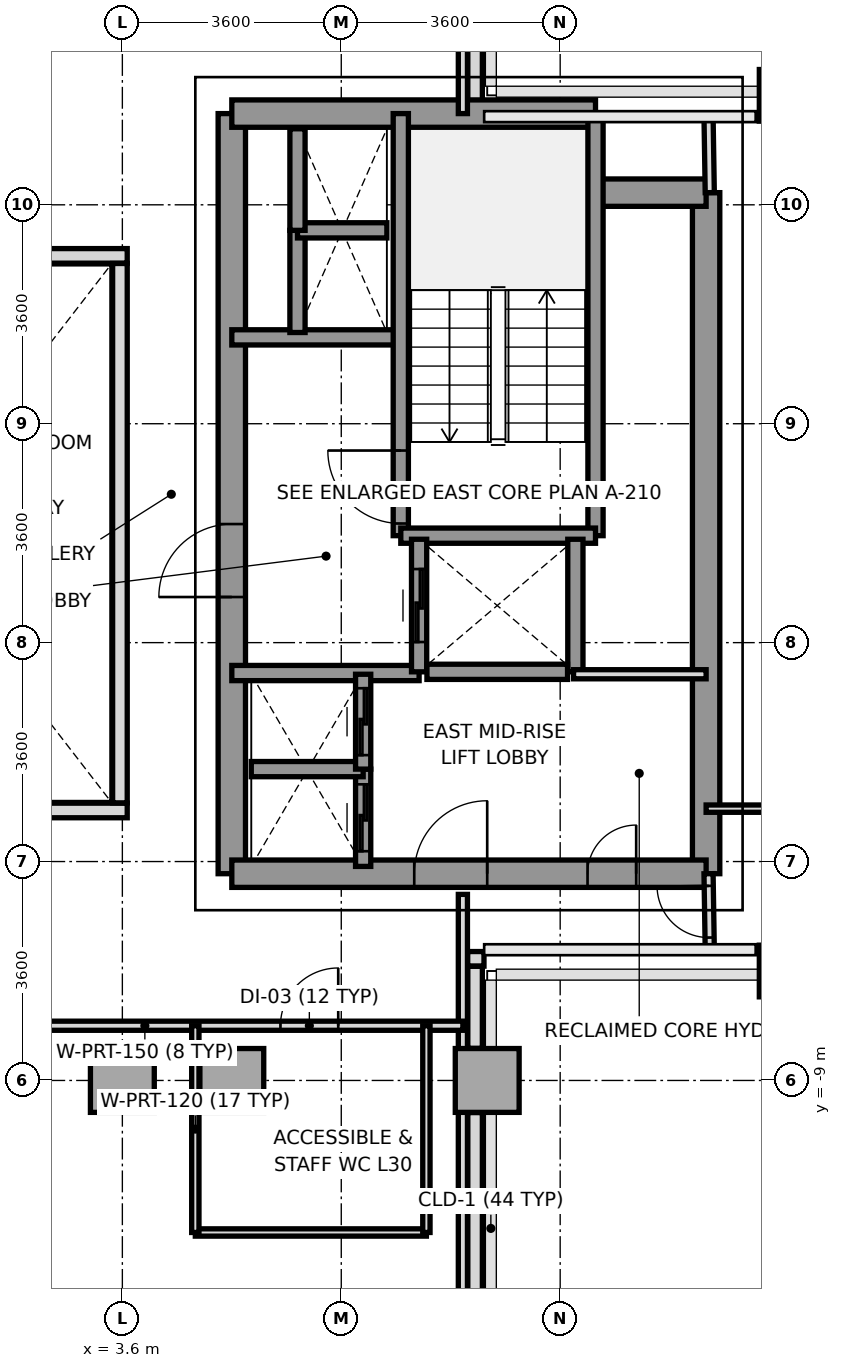
"""IFC4 building model, lengths in metres.
Left out: names, types, materials, properties, quantities, classifications, styles, units other than length and angle.
Written with IfcOpenShell. Run it as: python <this file> out.ifc"""

import sys

from ifc_helpers import new_model, si_unit, direction, frame, frame_2d, origin, origin_2d, place, context, subcontext, project, spatial, rectangle, extrude, source, transform, mapped, element, fill, save


model = new_model("IFC4")
c1 = context("Model", 3, precision=1e-05, world=origin(), true_north=direction((0.0, 1.0)))
c2 = subcontext(c1, "Body", "Model", "MODEL_VIEW")
j1 = project(units=[si_unit("LENGTHUNIT", "METRE"), si_unit("PLANEANGLEUNIT", "RADIAN")], contexts=[c1])
p1 = place(None, origin())
s1 = spatial("IfcSite", under=j1, at=p1, CompositionType="ELEMENT")
p2 = place(p1, origin())
s2 = spatial("IfcBuilding", under=s1, at=p2, CompositionType="ELEMENT")
p3 = place(p2, frame((0.0, 0.0, 114.2)))
s3 = spatial("IfcBuildingStorey", under=s2, at=p3, CompositionType="ELEMENT", Elevation=114.2)
m1 = source(origin(), c2, "Body", "SweptSolid", [
    extrude(rectangle(XDim=1.05, YDim=1.05, at=origin_2d()), origin(), (0.0, 0.0, 1.0), 3.2),
])
for number, where, z_axis, x_axis in (
    (1, (3.6, -9.0, 0.0), (0.0, 0.0, 1.0), (1.0, 0.0, 0.0)),
    (2, (5.4, -9.0, 0.0), (0.0, 0.0, 1.0), (1.0, 0.0, 0.0)),
    (3, (9.6, -9.0, 0.0), (0.0, 0.0, 1.0), (1.0, 0.0, 0.0)),
):
    element("IfcColumn", number, at=place(p3, frame(where, z_axis=z_axis, x_axis=x_axis)), inside=s3, PredefinedType="COLUMN", context=c2, shape_type="MappedRepresentation", body=[
        mapped(m1, transform((0.0, 0.0, 0.0), x_axis=(1.0, 0.0, 0.0), y_axis=(0.0, 1.0, 0.0), z_axis=(0.0, 0.0, 1.0), scale=1.0)),
    ])
m2 = source(origin(), c2, "Body", "SweptSolid", [
    extrude(rectangle(XDim=0.65, YDim=0.85, at=origin_2d()), origin(), (0.0, 0.0, 1.0), 3.2),
])
for number, where, z_axis, x_axis in (
    (4, (14.4, -7.2, 0.0), (0.0, 0.0, 1.0), (1.0, 0.0, 0.0)),
    (5, (14.4, 7.2, 0.0), (0.0, 0.0, 1.0), (1.0, 0.0, 0.0)),
):
    element("IfcColumn", number, at=place(p3, frame(where, z_axis=z_axis, x_axis=x_axis)), inside=s3, PredefinedType="COLUMN", context=c2, shape_type="MappedRepresentation", body=[
        mapped(m2, transform((0.0, 0.0, 0.0), x_axis=(1.0, 0.0, 0.0), y_axis=(0.0, 1.0, 0.0), z_axis=(0.0, 0.0, 1.0), scale=1.0)),
    ])
p4 = place(p3, frame((9.547, -7.0, 0.0), z_axis=(0.0, 0.0, 1.0), x_axis=(-1.0, 0.0, 0.0)))
e6 = element("IfcWall", 6, at=p4, inside=s3, PredefinedType="PARAPET", context=c2, shape_type="SweptSolid", body=[
    extrude(rectangle(XDim=0.269, YDim=0.24, at=frame_2d((0.135, 0.0))), origin(), (0.0, 0.0, 1.0), 1.15),
])
p5 = place(p3, frame((9.4, -7.123, 0.0), z_axis=(0.0, 0.0, 1.0), x_axis=(0.0, -1.0, 0.0)))
e7 = element("IfcWall", 7, at=p5, inside=s3, PredefinedType="PARAPET", context=c2, shape_type="SweptSolid", body=[
    extrude(rectangle(XDim=1.349, YDim=0.24, at=frame_2d((0.674, 0.0))), origin(), (0.0, 0.0, 1.0), 1.15),
])
p6 = place(p3, frame((9.4, -9.528, 0.0), z_axis=(0.0, 0.0, 1.0), x_axis=(0.0, -1.0, 0.0)))
e8 = element("IfcWall", 8, at=p6, inside=s3, PredefinedType="PARAPET", context=c2, shape_type="SweptSolid", body=[
    extrude(rectangle(XDim=6.075, YDim=0.24, at=frame_2d((3.037, 0.0))), origin(), (0.0, 0.0, 1.0), 1.15),
])
p7 = place(p3, frame((9.4, 8.472, 0.0), z_axis=(0.0, 0.0, 1.0), x_axis=(0.0, -1.0, 0.0)))
e9 = element("IfcWall", 9, at=p7, inside=s3, PredefinedType="PARAPET", context=c2, shape_type="SweptSolid", body=[
    extrude(rectangle(XDim=1.519, YDim=0.24, at=frame_2d((0.76, 0.0))), origin(), (0.0, 0.0, 1.0), 1.15),
])
p8 = place(p3, frame((13.2, -5.6, 0.0), z_axis=(0.0, 0.0, 1.0), x_axis=(0.0, 1.0, 0.0)))
e10 = element("IfcWall", 10, at=p8, inside=s3, PredefinedType="SHEAR", context=c2, shape_type="SweptSolid", body=[
    extrude(rectangle(XDim=11.2, YDim=0.45, at=frame_2d((5.6, 0.0))), origin(), (0.0, 0.0, 1.0), 3.2),
])
p9 = place(p3, frame((5.4, -5.6, 0.0), z_axis=(0.0, 0.0, 1.0), x_axis=(0.0, 1.0, 0.0)))
e11 = element("IfcWall", 11, at=p9, inside=s3, PredefinedType="SHEAR", context=c2, shape_type="SweptSolid", body=[
    extrude(rectangle(XDim=12.5, YDim=0.45, at=frame_2d((6.25, 0.0))), origin(), (0.0, 0.0, 1.0), 3.2),
])
p10 = place(p9, frame((4.55, 0.0, 0.0)))
e12 = element("IfcOpeningElement", 12, at=p10, cuts=e11, PredefinedType="OPENING", context=c2, shape_type="SweptSolid", body=[
    extrude(rectangle(XDim=1.2, YDim=2.2, at=frame_2d((0.6, 1.1))), frame((0.0, 0.235, 0.0), z_axis=(0.0, -1.0, 0.0), x_axis=(1.0, 0.0, 0.0)), (0.0, 0.0, 1.0), 0.47),
])
p11 = place(p3, frame((5.4, 6.9, 0.0), z_axis=(0.0, 0.0, 1.0), x_axis=(1.0, 0.0, 0.0)))
e13 = element("IfcWall", 13, at=p11, inside=s3, PredefinedType="SHEAR", context=c2, shape_type="SweptSolid", body=[
    extrude(rectangle(XDim=5.981, YDim=0.45, at=frame_2d((2.991, 0.0))), origin(), (0.0, 0.0, 1.0), 3.2),
])
p12 = place(p3, frame((11.381, 5.6, 0.0), z_axis=(0.0, 0.0, 1.0), x_axis=(1.0, 0.0, 0.0)))
e14 = element("IfcWall", 14, at=p12, inside=s3, PredefinedType="SHEAR", context=c2, shape_type="SweptSolid", body=[
    extrude(rectangle(XDim=1.819, YDim=0.45, at=frame_2d((0.909, 0.0))), origin(), (0.0, 0.0, 1.0), 3.2),
])
p13 = place(p3, frame((5.4, -5.6, 0.0), z_axis=(0.0, 0.0, 1.0), x_axis=(1.0, 0.0, 0.0)))
e15 = element("IfcWall", 15, at=p13, inside=s3, PredefinedType="SHEAR", context=c2, shape_type="SweptSolid", body=[
    extrude(rectangle(XDim=7.8, YDim=0.45, at=frame_2d((3.9, 0.0))), origin(), (0.0, 0.0, 1.0), 3.2),
])
p14 = place(p13, frame((3.0, 0.0, 0.0)))
e16 = element("IfcOpeningElement", 16, at=p14, cuts=e15, PredefinedType="OPENING", context=c2, shape_type="SweptSolid", body=[
    extrude(rectangle(XDim=1.2, YDim=2.2, at=frame_2d((0.6, 1.1))), frame((0.0, 0.235, 0.0), z_axis=(0.0, -1.0, 0.0), x_axis=(1.0, 0.0, 0.0)), (0.0, 0.0, 1.0), 0.47),
])
p15 = place(p13, frame((5.85, 0.0, 0.0)))
e17 = element("IfcOpeningElement", 17, at=p15, cuts=e15, PredefinedType="OPENING", context=c2, shape_type="SweptSolid", body=[
    extrude(rectangle(XDim=0.8, YDim=2.1, at=frame_2d((0.4, 1.05))), frame((0.0, 0.235, 0.0), z_axis=(0.0, -1.0, 0.0), x_axis=(1.0, 0.0, 0.0)), (0.0, 0.0, 1.0), 0.47),
])
p16 = place(p3, frame((5.4, 3.22, 0.0), z_axis=(0.0, 0.0, 1.0), x_axis=(1.0, 0.0, 0.0)))
e18 = element("IfcWall", 18, at=p16, inside=s3, PredefinedType="SOLIDWALL", context=c2, shape_type="SweptSolid", body=[
    extrude(rectangle(XDim=2.78, YDim=0.25, at=frame_2d((1.39, 0.0))), origin(), (0.0, 0.0, 1.0), 3.2),
])
p17 = place(p3, frame((5.4, -2.3, 0.0), z_axis=(0.0, 0.0, 1.0), x_axis=(1.0, 0.0, 0.0)))
e19 = element("IfcWall", 19, at=p17, inside=s3, PredefinedType="SOLIDWALL", context=c2, shape_type="SweptSolid", body=[
    extrude(rectangle(XDim=3.08, YDim=0.25, at=frame_2d((1.54, 0.0))), origin(), (0.0, 0.0, 1.0), 3.2),
])
p18 = place(p3, frame((8.179, -0.041, 0.0), z_axis=(0.0, 0.0, 1.0), x_axis=(0.0, 1.0, 0.0)))
e20 = element("IfcWall", 20, at=p18, inside=s3, PredefinedType="SOLIDWALL", context=c2, shape_type="SweptSolid", body=[
    extrude(rectangle(XDim=6.941, YDim=0.25, at=frame_2d((3.47, 0.0))), origin(), (0.0, 0.0, 1.0), 3.2),
])
p19 = place(p18, frame((0.2, 0.0, 0.0)))
e21 = element("IfcOpeningElement", 21, at=p19, cuts=e20, PredefinedType="OPENING", context=c2, shape_type="SweptSolid", body=[
    extrude(rectangle(XDim=1.2, YDim=2.2, at=frame_2d((0.6, 1.1))), frame((0.0, 0.135, 0.0), z_axis=(0.0, -1.0, 0.0), x_axis=(1.0, 0.0, 0.0)), (0.0, 0.0, 1.0), 0.27),
])
p20 = place(p3, frame((11.381, -0.041, 0.0), z_axis=(0.0, 0.0, 1.0), x_axis=(0.0, 1.0, 0.0)))
e22 = element("IfcWall", 22, at=p20, inside=s3, PredefinedType="SOLIDWALL", context=c2, shape_type="SweptSolid", body=[
    extrude(rectangle(XDim=6.941, YDim=0.25, at=frame_2d((3.47, 0.0))), origin(), (0.0, 0.0, 1.0), 3.2),
])
p21 = place(p3, frame((8.179, -0.041, 0.0), z_axis=(0.0, 0.0, 1.0), x_axis=(1.0, 0.0, 0.0)))
e23 = element("IfcWall", 23, at=p21, inside=s3, PredefinedType="SOLIDWALL", context=c2, shape_type="SweptSolid", body=[
    extrude(rectangle(XDim=3.202, YDim=0.25, at=frame_2d((1.601, 0.0))), origin(), (0.0, 0.0, 1.0), 3.2),
])
p22 = place(p3, frame((8.48, -2.28, 0.0), z_axis=(0.0, 0.0, 1.0), x_axis=(0.0, 1.0, 0.0)))
e24 = element("IfcWall", 24, at=p22, inside=s3, PredefinedType="SOLIDWALL", context=c2, shape_type="SweptSolid", body=[
    extrude(rectangle(XDim=2.18, YDim=0.25, at=frame_2d((1.09, 0.0))), origin(), (0.0, 0.0, 1.0), 3.2),
])
p23 = place(p22, frame((0.49, 0.0, 0.0)))
e25 = element("IfcOpeningElement", 25, at=p23, cuts=e24, PredefinedType="OPENING", context=c2, shape_type="SweptSolid", body=[
    extrude(rectangle(XDim=1.2, YDim=2.2, at=frame_2d((0.6, 1.1))), frame((0.0, 0.135, 0.0), z_axis=(0.0, -1.0, 0.0), x_axis=(1.0, 0.0, 0.0)), (0.0, 0.0, 1.0), 0.27),
])
p24 = place(p3, frame((11.05, -2.28, 0.0), z_axis=(0.0, 0.0, 1.0), x_axis=(0.0, 1.0, 0.0)))
e26 = element("IfcWall", 26, at=p24, inside=s3, PredefinedType="SOLIDWALL", context=c2, shape_type="SweptSolid", body=[
    extrude(rectangle(XDim=2.18, YDim=0.25, at=frame_2d((1.09, 0.0))), origin(), (0.0, 0.0, 1.0), 3.2),
])
p25 = place(p3, frame((8.609, -2.28, 0.0), z_axis=(0.0, 0.0, 1.0), x_axis=(1.0, 0.0, 0.0)))
e27 = element("IfcWall", 27, at=p25, inside=s3, PredefinedType="SOLIDWALL", context=c2, shape_type="SweptSolid", body=[
    extrude(rectangle(XDim=2.312, YDim=0.25, at=frame_2d((1.156, 0.0))), origin(), (0.0, 0.0, 1.0), 3.2),
])
p26 = place(p3, frame((7.56, -5.48, 0.0), z_axis=(0.0, 0.0, 1.0), x_axis=(0.0, 1.0, 0.0)))
e28 = element("IfcWall", 28, at=p26, inside=s3, PredefinedType="SOLIDWALL", context=c2, shape_type="SweptSolid", body=[
    extrude(rectangle(XDim=1.6, YDim=0.25, at=frame_2d((0.8, 0.0))), origin(), (0.0, 0.0, 1.0), 3.2),
])
p27 = place(p26, frame((0.25, 0.0, 0.0)))
e29 = element("IfcOpeningElement", 29, at=p27, cuts=e28, PredefinedType="OPENING", context=c2, shape_type="SweptSolid", body=[
    extrude(rectangle(XDim=1.1, YDim=2.2, at=frame_2d((0.55, 1.1))), frame((0.0, 0.135, 0.0), z_axis=(0.0, -1.0, 0.0), x_axis=(1.0, 0.0, 0.0)), (0.0, 0.0, 1.0), 0.27),
])
p28 = place(p3, frame((5.72, -3.88, 0.0), z_axis=(0.0, 0.0, 1.0), x_axis=(1.0, 0.0, 0.0)))
e30 = element("IfcWall", 30, at=p28, inside=s3, PredefinedType="SOLIDWALL", context=c2, shape_type="SweptSolid", body=[
    extrude(rectangle(XDim=1.84, YDim=0.25, at=frame_2d((0.92, 0.0))), origin(), (0.0, 0.0, 1.0), 3.2),
])
p29 = place(p3, frame((7.56, -3.88, 0.0), z_axis=(0.0, 0.0, 1.0), x_axis=(0.0, 1.0, 0.0)))
e31 = element("IfcWall", 31, at=p29, inside=s3, PredefinedType="SOLIDWALL", context=c2, shape_type="SweptSolid", body=[
    extrude(rectangle(XDim=1.56, YDim=0.25, at=frame_2d((0.78, 0.0))), origin(), (0.0, 0.0, 1.0), 3.2),
])
p30 = place(p29, frame((0.23, 0.0, 0.0)))
e32 = element("IfcOpeningElement", 32, at=p30, cuts=e31, PredefinedType="OPENING", context=c2, shape_type="SweptSolid", body=[
    extrude(rectangle(XDim=1.1, YDim=2.2, at=frame_2d((0.55, 1.1))), frame((0.0, 0.135, 0.0), z_axis=(0.0, -1.0, 0.0), x_axis=(1.0, 0.0, 0.0)), (0.0, 0.0, 1.0), 0.27),
])
p31 = place(p3, frame((6.48, 3.3, 0.0), z_axis=(0.0, 0.0, 1.0), x_axis=(0.0, 1.0, 0.0)))
e33 = element("IfcWall", 33, at=p31, inside=s3, PredefinedType="SOLIDWALL", context=c2, shape_type="SweptSolid", body=[
    extrude(rectangle(XDim=1.68, YDim=0.25, at=frame_2d((0.84, 0.0))), origin(), (0.0, 0.0, 1.0), 3.2),
])
p32 = place(p3, frame((6.48, 4.98, 0.0), z_axis=(0.0, 0.0, 1.0), x_axis=(1.0, 0.0, 0.0)))
e34 = element("IfcWall", 34, at=p32, inside=s3, PredefinedType="SOLIDWALL", context=c2, shape_type="SweptSolid", body=[
    extrude(rectangle(XDim=1.47, YDim=0.25, at=frame_2d((0.735, 0.0))), origin(), (0.0, 0.0, 1.0), 3.2),
])
p33 = place(p3, frame((6.48, 4.98, 0.0), z_axis=(0.0, 0.0, 1.0), x_axis=(0.0, 1.0, 0.0)))
e35 = element("IfcWall", 35, at=p33, inside=s3, PredefinedType="SOLIDWALL", context=c2, shape_type="SweptSolid", body=[
    extrude(rectangle(XDim=1.67, YDim=0.25, at=frame_2d((0.835, 0.0))), origin(), (0.0, 0.0, 1.0), 3.2),
])
p34 = place(p3, frame((11.02, -2.32, 0.0), z_axis=(0.0, 0.0, 1.0), x_axis=(1.0, 0.0, 0.0)))
e36 = element("IfcWall", 36, at=p34, inside=s3, PredefinedType="PARTITIONING", context=c2, shape_type="SweptSolid", body=[
    extrude(rectangle(XDim=2.18, YDim=0.15, at=frame_2d((1.09, 0.0))), origin(), (0.0, 0.0, 1.0), 3.2),
])
p35 = place(p3, frame((9.2, 6.9, 0.0), z_axis=(0.0, 0.0, 1.0), x_axis=(0.0, 1.0, 0.0)))
e37 = element("IfcWall", 37, at=p35, inside=s3, PredefinedType="PARTITIONING", context=c2, shape_type="SweptSolid", body=[
    extrude(rectangle(XDim=8.78, YDim=0.15, at=frame_2d((4.39, 0.0))), origin(), (0.0, 0.0, 1.0), 2.7),
])
p36 = place(p3, frame((9.2, -15.68, 0.0), z_axis=(0.0, 0.0, 1.0), x_axis=(0.0, 1.0, 0.0)))
e38 = element("IfcWall", 38, at=p36, inside=s3, PredefinedType="PARTITIONING", context=c2, shape_type="SweptSolid", body=[
    extrude(rectangle(XDim=9.74, YDim=0.15, at=frame_2d((4.87, 0.0))), origin(), (0.0, 0.0, 1.0), 2.7),
])
p37 = place(p3, frame((-1.26, -8.1, 0.0), z_axis=(0.0, 0.0, 1.0), x_axis=(1.0, 0.0, 0.0)))
e39 = element("IfcWall", 39, at=p37, inside=s3, PredefinedType="PARTITIONING", context=c2, shape_type="SweptSolid", body=[
    extrude(rectangle(XDim=10.46, YDim=0.15, at=frame_2d((5.23, 0.0))), origin(), (0.0, 0.0, 1.0), 2.75),
])
p38 = place(p37, frame((7.46, 0.0, 0.0)))
e40 = element("IfcOpeningElement", 40, at=p38, cuts=e39, PredefinedType="OPENING", context=c2, shape_type="SweptSolid", body=[
    extrude(rectangle(XDim=0.95, YDim=2.15, at=frame_2d((0.475, 1.075))), frame((0.0, 0.085, 0.0), z_axis=(0.0, -1.0, 0.0), x_axis=(1.0, 0.0, 0.0)), (0.0, 0.0, 1.0), 0.17),
])
p39 = place(p3, frame((4.8, -11.5, 0.0), z_axis=(0.0, 0.0, 1.0), x_axis=(1.0, 0.0, 0.0)))
e41 = element("IfcWall", 41, at=p39, inside=s3, PredefinedType="PARTITIONING", context=c2, shape_type="SweptSolid", body=[
    extrude(rectangle(XDim=3.8, YDim=0.12, at=frame_2d((1.9, 0.0))), origin(), (0.0, 0.0, 1.0), 3.2),
])
p40 = place(p3, frame((4.8, -11.5, 0.0), z_axis=(0.0, 0.0, 1.0), x_axis=(0.0, 1.0, 0.0)))
e42 = element("IfcWall", 42, at=p40, inside=s3, PredefinedType="PARTITIONING", context=c2, shape_type="SweptSolid", body=[
    extrude(rectangle(XDim=3.4, YDim=0.12, at=frame_2d((1.7, 0.0))), origin(), (0.0, 0.0, 1.0), 3.2),
])
p41 = place(p3, frame((8.6, -11.5, 0.0), z_axis=(0.0, 0.0, 1.0), x_axis=(0.0, 1.0, 0.0)))
e43 = element("IfcWall", 43, at=p41, inside=s3, PredefinedType="PARTITIONING", context=c2, shape_type="SweptSolid", body=[
    extrude(rectangle(XDim=3.4, YDim=0.12, at=frame_2d((1.7, 0.0))), origin(), (0.0, 0.0, 1.0), 2.7),
])
p42 = place(p3, frame((13.26, 5.6, 0.0), z_axis=(0.0, 0.0, 1.0), x_axis=(-0.016013571389, 0.999871774545, 0.0)))
e44 = element("IfcWall", 44, at=p42, inside=s3, PredefinedType="PARTITIONING", context=c2, shape_type="SweptSolid", body=[
    extrude(rectangle(XDim=1.25, YDim=0.15, at=frame_2d((0.625, 0.0))), origin(), (0.0, 0.0, 1.0), 3.2),
])
p43 = place(p3, frame((13.26, -6.85, 0.0), z_axis=(0.0, 0.0, 1.0), x_axis=(-0.016013571389, 0.999871774545, 0.0)))
e45 = element("IfcWall", 45, at=p43, inside=s3, PredefinedType="PARTITIONING", context=c2, shape_type="SweptSolid", body=[
    extrude(rectangle(XDim=1.25, YDim=0.15, at=frame_2d((0.625, 0.0))), origin(), (0.0, 0.0, 1.0), 3.2),
])
p44 = place(p43, frame((0.2, 0.0, 0.0)))
e46 = element("IfcOpeningElement", 46, at=p44, cuts=e45, PredefinedType="OPENING", context=c2, shape_type="SweptSolid", body=[
    extrude(rectangle(XDim=0.85, YDim=2.1, at=frame_2d((0.425, 1.05))), frame((0.0, 0.085, 0.0), z_axis=(0.0, -1.0, 0.0), x_axis=(1.0, 0.0, 0.0)), (0.0, 0.0, 1.0), 0.17),
])
p45 = place(p3, frame((13.2, -4.53, 0.0), z_axis=(0.0, 0.0, 1.0), x_axis=(1.0, 0.0, 0.0)))
e47 = element("IfcWall", 47, at=p45, inside=s3, PredefinedType="PARTITIONING", context=c2, shape_type="SweptSolid", body=[
    extrude(rectangle(XDim=10.1, YDim=0.12, at=frame_2d((5.05, 0.0))), origin(), (0.0, 0.0, 1.0), 2.75),
])
p46 = place(p45, frame((7.65, 0.0, 0.0)))
e48 = element("IfcOpeningElement", 48, at=p46, cuts=e47, PredefinedType="OPENING", context=c2, shape_type="SweptSolid", body=[
    extrude(rectangle(XDim=0.95, YDim=2.15, at=frame_2d((0.475, 1.075))), frame((0.0, 0.07, 0.0), z_axis=(0.0, -1.0, 0.0), x_axis=(1.0, 0.0, 0.0)), (0.0, 0.0, 1.0), 0.14),
])
for number, where, z_axis, x_axis in (
    (49, (-3.68, -4.56, 0.0), (0.0, 0.0, 1.0), (1.0, 0.0, 0.0)),
    (50, (-3.68, 4.56, 0.0), (0.0, 0.0, 1.0), (1.0, 0.0, 0.0)),
):
    element("IfcWall", number, at=place(p3, frame(where, z_axis=z_axis, x_axis=x_axis)), inside=s3, PredefinedType="PARAPET", context=c2, shape_type="SweptSolid", body=[
        extrude(rectangle(XDim=7.36, YDim=0.24, at=frame_2d((3.68, 0.0))), origin(), (0.0, 0.0, 1.0), 1.15),
    ])
p47 = place(p3, frame((3.56, -4.435, 0.0), z_axis=(0.0, 0.0, 1.0), x_axis=(0.0, 1.0, 0.0)))
e51 = element("IfcWall", 51, at=p47, inside=s3, PredefinedType="PARAPET", context=c2, shape_type="SweptSolid", body=[
    extrude(rectangle(XDim=8.87, YDim=0.24, at=frame_2d((4.435, 0.0))), origin(), (0.0, 0.0, 1.0), 1.15),
])
m3 = source(origin(), c2, "Body", "SweptSolid", [
    extrude(rectangle(XDim=1.2, YDim=2.2, at=frame_2d((0.6, 1.1))), frame((0.0, 0.025, 0.0), z_axis=(0.0, -1.0, 0.0), x_axis=(1.0, 0.0, 0.0)), (0.0, 0.0, 1.0), 0.05),
])
p48 = place(p19, origin())
e52 = element("IfcDoor", 52, at=p48, inside=s3, OperationType="SINGLE_SWING_RIGHT", PredefinedType="DOOR", context=c2, shape_type="MappedRepresentation", body=[
    mapped(m3, transform((0.0, 0.0, 0.0), x_axis=(1.0, 0.0, 0.0), y_axis=(0.0, 1.0, 0.0), z_axis=(0.0, 0.0, 1.0), scale=1.0)),
])
fill(e21, e52)
p49 = place(p10, origin())
e53 = element("IfcDoor", 53, at=p49, inside=s3, OperationType="SINGLE_SWING_LEFT", PredefinedType="DOOR", context=c2, shape_type="MappedRepresentation", body=[
    mapped(m3, transform((0.0, 0.0, 0.0), x_axis=(1.0, 0.0, 0.0), y_axis=(0.0, 1.0, 0.0), z_axis=(0.0, 0.0, 1.0), scale=1.0)),
])
fill(e12, e53)
p50 = place(p14, origin())
e54 = element("IfcDoor", 54, at=p50, inside=s3, OperationType="SINGLE_SWING_RIGHT", PredefinedType="DOOR", context=c2, shape_type="MappedRepresentation", body=[
    mapped(m3, transform((0.0, 0.0, 0.0), x_axis=(1.0, 0.0, 0.0), y_axis=(0.0, 1.0, 0.0), z_axis=(0.0, 0.0, 1.0), scale=1.0)),
])
fill(e16, e54)
m4 = source(origin(), c2, "Body", "SweptSolid", [
    extrude(rectangle(XDim=0.8, YDim=2.1, at=frame_2d((0.4, 1.05))), frame((0.0, 0.025, 0.0), z_axis=(0.0, -1.0, 0.0), x_axis=(1.0, 0.0, 0.0)), (0.0, 0.0, 1.0), 0.05),
])
p51 = place(p15, origin())
e55 = element("IfcDoor", 55, at=p51, inside=s3, OperationType="SINGLE_SWING_RIGHT", PredefinedType="DOOR", context=c2, shape_type="MappedRepresentation", body=[
    mapped(m4, transform((0.0, 0.0, 0.0), x_axis=(1.0, 0.0, 0.0), y_axis=(0.0, 1.0, 0.0), z_axis=(0.0, 0.0, 1.0), scale=1.0)),
])
fill(e17, e55)
p52 = place(p23, origin())
e56 = element("IfcDoor", 56, at=p52, inside=s3, OperationType="SLIDING_TO_RIGHT", PredefinedType="DOOR", context=c2, shape_type="MappedRepresentation", body=[
    mapped(m3, transform((0.0, 0.0, 0.0), x_axis=(1.0, 0.0, 0.0), y_axis=(0.0, 1.0, 0.0), z_axis=(0.0, 0.0, 1.0), scale=1.0)),
])
fill(e25, e56)
m5 = source(origin(), c2, "Body", "SweptSolid", [
    extrude(rectangle(XDim=1.1, YDim=2.2, at=frame_2d((0.55, 1.1))), frame((0.0, 0.025, 0.0), z_axis=(0.0, -1.0, 0.0), x_axis=(1.0, 0.0, 0.0)), (0.0, 0.0, 1.0), 0.05),
])
p53 = place(p27, origin())
e57 = element("IfcDoor", 57, at=p53, inside=s3, OperationType="SLIDING_TO_LEFT", PredefinedType="DOOR", context=c2, shape_type="MappedRepresentation", body=[
    mapped(m5, transform((0.0, 0.0, 0.0), x_axis=(1.0, 0.0, 0.0), y_axis=(0.0, 1.0, 0.0), z_axis=(0.0, 0.0, 1.0), scale=1.0)),
])
fill(e29, e57)
p54 = place(p30, origin())
e58 = element("IfcDoor", 58, at=p54, inside=s3, OperationType="SLIDING_TO_LEFT", PredefinedType="DOOR", context=c2, shape_type="MappedRepresentation", body=[
    mapped(m5, transform((0.0, 0.0, 0.0), x_axis=(1.0, 0.0, 0.0), y_axis=(0.0, 1.0, 0.0), z_axis=(0.0, 0.0, 1.0), scale=1.0)),
])
fill(e32, e58)
m6 = source(origin(), c2, "Body", "SweptSolid", [
    extrude(rectangle(XDim=0.95, YDim=2.15, at=frame_2d((0.475, 1.075))), frame((0.0, 0.025, 0.0), z_axis=(0.0, -1.0, 0.0), x_axis=(1.0, 0.0, 0.0)), (0.0, 0.0, 1.0), 0.05),
])
p55 = place(p38, origin())
e59 = element("IfcDoor", 59, at=p55, inside=s3, OperationType="SINGLE_SWING_RIGHT", PredefinedType="DOOR", context=c2, shape_type="MappedRepresentation", body=[
    mapped(m6, transform((0.0, 0.0, 0.0), x_axis=(1.0, 0.0, 0.0), y_axis=(0.0, 1.0, 0.0), z_axis=(0.0, 0.0, 1.0), scale=1.0)),
])
fill(e40, e59)
m7 = source(origin(), c2, "Body", "SweptSolid", [
    extrude(rectangle(XDim=0.85, YDim=2.1, at=frame_2d((0.425, 1.05))), frame((0.0, 0.025, 0.0), z_axis=(0.0, -1.0, 0.0), x_axis=(1.0, 0.0, 0.0)), (0.0, 0.0, 1.0), 0.05),
])
p56 = place(p44, origin())
e60 = element("IfcDoor", 60, at=p56, inside=s3, OperationType="SINGLE_SWING_RIGHT", PredefinedType="DOOR", context=c2, shape_type="MappedRepresentation", body=[
    mapped(m7, transform((0.0, 0.0, 0.0), x_axis=(1.0, 0.0, 0.0), y_axis=(0.0, 1.0, 0.0), z_axis=(0.0, 0.0, 1.0), scale=1.0)),
])
fill(e46, e60)
save(model, sys.argv[1])
